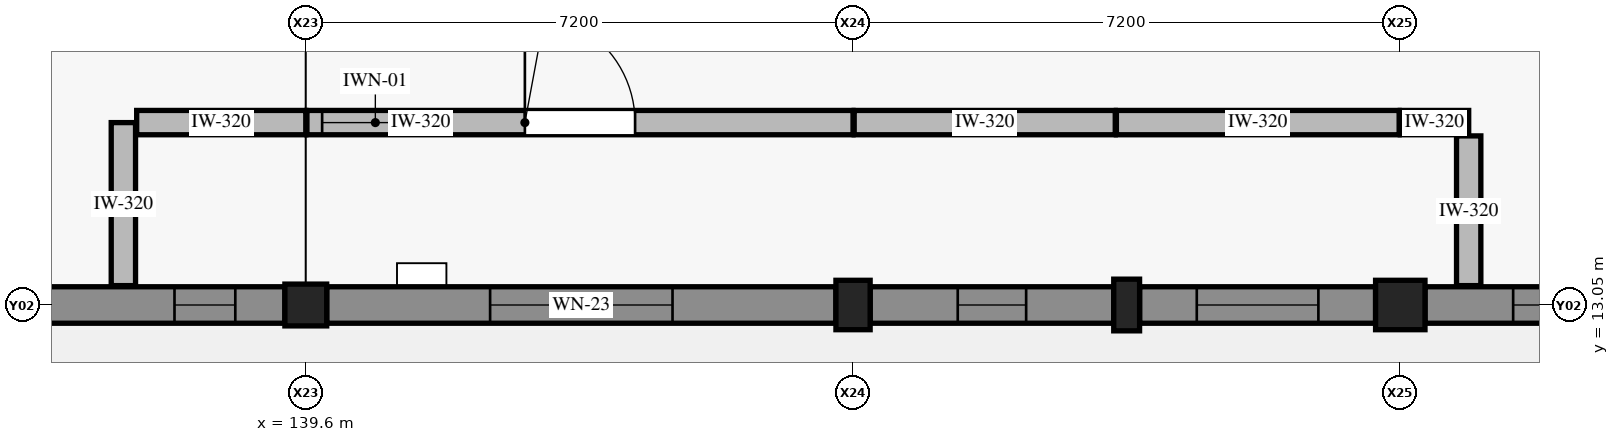
"""IFC4 building model, lengths in metres.
Left out: names, types, materials, properties, quantities, classifications, styles, units other than length and angle.
Written with IfcOpenShell. Run it as: python <this file> out.ifc"""

import sys

from ifc_helpers import new_model, si_unit, direction, frame, frame_2d, origin, origin_2d, place, context, subcontext, project, spatial, rectangle, extrude, element, fill, save


model = new_model("IFC4")
c1 = context("Model", 3, precision=1e-05, world=origin(), true_north=direction((0.0, 1.0)))
c2 = subcontext(c1, "Body", "Model", "MODEL_VIEW")
j1 = project(units=[si_unit("LENGTHUNIT", "METRE"), si_unit("PLANEANGLEUNIT", "RADIAN")], contexts=[c1])
p1 = place(None, origin())
s1 = spatial("IfcSite", under=j1, at=p1, CompositionType="ELEMENT")
p2 = place(p1, origin())
s2 = spatial("IfcBuilding", under=s1, at=p2, CompositionType="ELEMENT")
p3 = place(p2, origin())
s3 = spatial("IfcBuildingStorey", under=s2, at=p3, CompositionType="ELEMENT", Elevation=0.0)
p4 = place(p3, frame((139.6, 13.05, 0.0), z_axis=(0.0, 0.0, 1.0), x_axis=(1.0, 0.0, 0.0)))
e1 = element("IfcColumn", 1, at=p4, inside=s3, PredefinedType="COLUMN", context=c2, shape_type="SweptSolid", body=[
    extrude(rectangle(XDim=0.55, YDim=0.55, at=origin_2d()), origin(), (0.0, 0.0, 1.0), 4.8),
])
p5 = place(p3, frame((146.8, 13.05, 0.0), z_axis=(0.0, 0.0, 1.0), x_axis=(1.0, 0.0, 0.0)))
e2 = element("IfcColumn", 2, at=p5, inside=s3, PredefinedType="COLUMN", context=c2, shape_type="SweptSolid", body=[
    extrude(rectangle(XDim=0.45, YDim=0.65, at=origin_2d()), origin(), (0.0, 0.0, 1.0), 4.8),
])
p6 = place(p3, frame((154.0, 13.05, 0.0), z_axis=(0.0, 0.0, 1.0), x_axis=(1.0, 0.0, 0.0)))
e3 = element("IfcColumn", 3, at=p6, inside=s3, PredefinedType="COLUMN", context=c2, shape_type="SweptSolid", body=[
    extrude(rectangle(XDim=0.65, YDim=0.65, at=origin_2d()), origin(), (0.0, 0.0, 1.0), 4.8),
])
p7 = place(p3, frame((150.4, 13.05, 0.0), z_axis=(0.0, 0.0, 1.0), x_axis=(1.0, 0.0, 0.0)))
e4 = element("IfcColumn", 4, at=p7, inside=s3, PredefinedType="PILASTER", context=c2, shape_type="SweptSolid", body=[
    extrude(rectangle(XDim=0.34, YDim=0.68, at=origin_2d()), origin(), (0.0, 0.0, 1.0), 4.8),
])
p8 = place(p3, frame((157.25, 13.05, 0.0), z_axis=(0.0, 0.0, 1.0), x_axis=(-1.0, 0.0, 0.0)))
e5 = element("IfcWall", 5, at=p8, inside=s3, PredefinedType="SOLIDWALL", context=c2, shape_type="SweptSolid", body=[
    extrude(rectangle(XDim=2.925, YDim=0.48, at=frame_2d((1.462, 0.0))), origin(), (0.0, 0.0, 1.0), 3.64),
])
p9 = place(p8, frame((0.565, 0.0, 0.6)))
e6 = element("IfcOpeningElement", 6, at=p9, cuts=e5, PredefinedType="OPENING", context=c2, shape_type="SweptSolid", body=[
    extrude(rectangle(XDim=1.2, YDim=2.2, at=frame_2d((0.6, 1.1))), frame((0.0, 0.25, 0.0), z_axis=(0.0, -1.0, 0.0), x_axis=(1.0, 0.0, 0.0)), (0.0, 0.0, 1.0), 0.5),
])
p10 = place(p3, frame((153.675, 13.05, 0.0), z_axis=(0.0, 0.0, 1.0), x_axis=(-1.0, 0.0, 0.0)))
e7 = element("IfcWall", 7, at=p10, inside=s3, PredefinedType="SOLIDWALL", context=c2, shape_type="SweptSolid", body=[
    extrude(rectangle(XDim=3.105, YDim=0.48, at=frame_2d((1.552, 0.0))), origin(), (0.0, 0.0, 1.0), 3.64),
])
p11 = place(p10, frame((0.752, 0.0, 0.6)))
e8 = element("IfcOpeningElement", 8, at=p11, cuts=e7, PredefinedType="OPENING", context=c2, shape_type="SweptSolid", body=[
    extrude(rectangle(XDim=1.6, YDim=2.2, at=frame_2d((0.8, 1.1))), frame((0.0, 0.25, 0.0), z_axis=(0.0, -1.0, 0.0), x_axis=(1.0, 0.0, 0.0)), (0.0, 0.0, 1.0), 0.5),
])
p12 = place(p3, frame((150.23, 13.05, 0.0), z_axis=(0.0, 0.0, 1.0), x_axis=(-1.0, 0.0, 0.0)))
e9 = element("IfcWall", 9, at=p12, inside=s3, PredefinedType="SOLIDWALL", context=c2, shape_type="SweptSolid", body=[
    extrude(rectangle(XDim=3.205, YDim=0.48, at=frame_2d((1.603, 0.0))), origin(), (0.0, 0.0, 1.0), 3.64),
])
p13 = place(p12, frame((1.153, 0.0, 0.9)))
e10 = element("IfcOpeningElement", 10, at=p13, cuts=e9, PredefinedType="OPENING", context=c2, shape_type="SweptSolid", body=[
    extrude(rectangle(XDim=0.9, YDim=1.2, at=frame_2d((0.45, 0.6))), frame((0.0, 0.25, 0.0), z_axis=(0.0, -1.0, 0.0), x_axis=(1.0, 0.0, 0.0)), (0.0, 0.0, 1.0), 0.5),
])
p14 = place(p3, frame((146.575, 13.05, 0.0), z_axis=(0.0, 0.0, 1.0), x_axis=(-1.0, 0.0, 0.0)))
e11 = element("IfcWall", 11, at=p14, inside=s3, PredefinedType="SOLIDWALL", context=c2, shape_type="SweptSolid", body=[
    extrude(rectangle(XDim=6.7, YDim=0.48, at=frame_2d((3.35, 0.0))), origin(), (0.0, 0.0, 1.0), 3.64),
])
p15 = place(p14, frame((2.15, 0.0, 0.9)))
e12 = element("IfcOpeningElement", 12, at=p15, cuts=e11, PredefinedType="OPENING", context=c2, shape_type="SweptSolid", body=[
    extrude(rectangle(XDim=2.4, YDim=0.9, at=frame_2d((1.2, 0.45))), frame((0.0, 0.25, 0.0), z_axis=(0.0, -1.0, 0.0), x_axis=(1.0, 0.0, 0.0)), (0.0, 0.0, 1.0), 0.5),
])
p16 = place(p3, frame((139.325, 13.05, 0.0), z_axis=(0.0, 0.0, 1.0), x_axis=(-1.0, 0.0, 0.0)))
e13 = element("IfcWall", 13, at=p16, inside=s3, PredefinedType="SOLIDWALL", context=c2, shape_type="SweptSolid", body=[
    extrude(rectangle(XDim=3.135, YDim=0.48, at=frame_2d((1.567, 0.0))), origin(), (0.0, 0.0, 1.0), 3.64),
])
p17 = place(p16, frame((0.653, 0.0, 0.6)))
e14 = element("IfcOpeningElement", 14, at=p17, cuts=e13, PredefinedType="OPENING", context=c2, shape_type="SweptSolid", body=[
    extrude(rectangle(XDim=0.8, YDim=2.6, at=frame_2d((0.4, 1.3))), frame((0.0, 0.25, 0.0), z_axis=(0.0, -1.0, 0.0), x_axis=(1.0, 0.0, 0.0)), (0.0, 0.0, 1.0), 0.5),
])
p18 = place(p3, frame((154.0, 15.45, 0.0), z_axis=(0.0, 0.0, 1.0), x_axis=(1.0, 0.0, 0.0)))
e15 = element("IfcWall", 15, at=p18, inside=s3, PredefinedType="PARTITIONING", context=c2, shape_type="SweptSolid", body=[
    extrude(rectangle(XDim=0.9, YDim=0.32, at=frame_2d((0.45, 0.0))), origin(), (0.0, 0.0, 1.0), 3.965),
])
p19 = place(p3, frame((154.9, 13.305, 0.0), z_axis=(0.0, 0.0, 1.0), x_axis=(0.0, 1.0, 0.0)))
e16 = element("IfcWall", 16, at=p19, inside=s3, PredefinedType="PARTITIONING", context=c2, shape_type="SweptSolid", body=[
    extrude(rectangle(XDim=1.97, YDim=0.32, at=frame_2d((0.985, 0.0))), origin(), (0.0, 0.0, 1.0), 4.46),
])
p20 = place(p3, frame((137.2, 13.305, 0.0), z_axis=(0.0, 0.0, 1.0), x_axis=(0.0, 1.0, 0.0)))
e17 = element("IfcWall", 17, at=p20, inside=s3, PredefinedType="PARTITIONING", context=c2, shape_type="SweptSolid", body=[
    extrude(rectangle(XDim=2.145, YDim=0.32, at=frame_2d((1.073, 0.0))), origin(), (0.0, 0.0, 1.0), 3.985),
])
p21 = place(p3, frame((137.375, 15.45, 0.0), z_axis=(0.0, 0.0, 1.0), x_axis=(1.0, 0.0, 0.0)))
e18 = element("IfcWall", 18, at=p21, inside=s3, PredefinedType="PARTITIONING", context=c2, shape_type="SweptSolid", body=[
    extrude(rectangle(XDim=2.225, YDim=0.32, at=frame_2d((1.113, 0.0))), origin(), (0.0, 0.0, 1.0), 3.725),
])
p22 = place(p3, frame((139.615, 15.45, 0.0), z_axis=(0.0, 0.0, 1.0), x_axis=(1.0, 0.0, 0.0)))
e19 = element("IfcWall", 19, at=p22, inside=s3, PredefinedType="PARTITIONING", context=c2, shape_type="SweptSolid", body=[
    extrude(rectangle(XDim=7.185, YDim=0.32, at=frame_2d((3.593, 0.0))), origin(), (0.0, 0.0, 1.0), 3.725),
])
p23 = place(p22, frame((2.867, 0.0, 0.0)))
e20 = element("IfcOpeningElement", 20, at=p23, cuts=e19, PredefinedType="OPENING", context=c2, shape_type="SweptSolid", body=[
    extrude(rectangle(XDim=1.45, YDim=2.25, at=frame_2d((0.725, 1.125))), frame((0.0, 0.17, 0.0), z_axis=(0.0, -1.0, 0.0), x_axis=(1.0, 0.0, 0.0)), (0.0, 0.0, 1.0), 0.34),
])
p24 = place(p22, frame((0.2, 0.0, 1.05)))
e21 = element("IfcOpeningElement", 21, at=p24, cuts=e19, PredefinedType="OPENING", context=c2, shape_type="SweptSolid", body=[
    extrude(rectangle(XDim=1.4, YDim=1.1, at=frame_2d((0.7, 0.55))), frame((0.0, 0.17, 0.0), z_axis=(0.0, -1.0, 0.0), x_axis=(1.0, 0.0, 0.0)), (0.0, 0.0, 1.0), 0.34),
])
p25 = place(p3, frame((146.815, 15.45, 0.0), z_axis=(0.0, 0.0, 1.0), x_axis=(1.0, 0.0, 0.0)))
e22 = element("IfcWall", 22, at=p25, inside=s3, PredefinedType="PARTITIONING", context=c2, shape_type="SweptSolid", body=[
    extrude(rectangle(XDim=3.435, YDim=0.32, at=frame_2d((1.718, 0.0))), origin(), (0.0, 0.0, 1.0), 3.795),
])
p26 = place(p3, frame((150.265, 15.45, 0.0), z_axis=(0.0, 0.0, 1.0), x_axis=(1.0, 0.0, 0.0)))
e23 = element("IfcWall", 23, at=p26, inside=s3, PredefinedType="PARTITIONING", context=c2, shape_type="SweptSolid", body=[
    extrude(rectangle(XDim=3.72, YDim=0.32, at=frame_2d((1.86, 0.0))), origin(), (0.0, 0.0, 1.0), 3.965),
])
p27 = place(p9, origin())
e24 = element("IfcWindow", 24, at=p27, inside=s3, PartitioningType="SINGLE_PANEL", PredefinedType="WINDOW", context=c2, shape_type="SweptSolid", body=[
    extrude(rectangle(XDim=1.2, YDim=2.2, at=frame_2d((0.6, 1.1))), frame((0.0, 0.03, 0.0), z_axis=(0.0, -1.0, 0.0), x_axis=(1.0, 0.0, 0.0)), (0.0, 0.0, 1.0), 0.06),
])
fill(e6, e24)
p28 = place(p11, origin())
e25 = element("IfcWindow", 25, at=p28, inside=s3, PartitioningType="SINGLE_PANEL", PredefinedType="WINDOW", context=c2, shape_type="SweptSolid", body=[
    extrude(rectangle(XDim=1.6, YDim=2.2, at=frame_2d((0.8, 1.1))), frame((0.0, 0.03, 0.0), z_axis=(0.0, -1.0, 0.0), x_axis=(1.0, 0.0, 0.0)), (0.0, 0.0, 1.0), 0.06),
])
fill(e8, e25)
p29 = place(p13, origin())
e26 = element("IfcWindow", 26, at=p29, inside=s3, PartitioningType="SINGLE_PANEL", PredefinedType="WINDOW", context=c2, shape_type="SweptSolid", body=[
    extrude(rectangle(XDim=0.9, YDim=1.2, at=frame_2d((0.45, 0.6))), frame((0.0, 0.03, 0.0), z_axis=(0.0, -1.0, 0.0), x_axis=(1.0, 0.0, 0.0)), (0.0, 0.0, 1.0), 0.06),
])
fill(e10, e26)
p30 = place(p15, origin())
e27 = element("IfcWindow", 27, at=p30, inside=s3, PartitioningType="SINGLE_PANEL", PredefinedType="WINDOW", context=c2, shape_type="SweptSolid", body=[
    extrude(rectangle(XDim=2.4, YDim=0.9, at=frame_2d((1.2, 0.45))), frame((0.0, 0.03, 0.0), z_axis=(0.0, -1.0, 0.0), x_axis=(1.0, 0.0, 0.0)), (0.0, 0.0, 1.0), 0.06),
])
fill(e12, e27)
p31 = place(p17, origin())
e28 = element("IfcWindow", 28, at=p31, inside=s3, PartitioningType="SINGLE_PANEL", PredefinedType="WINDOW", context=c2, shape_type="SweptSolid", body=[
    extrude(rectangle(XDim=0.8, YDim=2.6, at=frame_2d((0.4, 1.3))), frame((0.0, 0.03, 0.0), z_axis=(0.0, -1.0, 0.0), x_axis=(1.0, 0.0, 0.0)), (0.0, 0.0, 1.0), 0.06),
])
fill(e14, e28)
p32 = place(p23, origin())
e29 = element("IfcDoor", 29, at=p32, inside=s3, OperationType="SINGLE_SWING_LEFT", PredefinedType="DOOR", context=c2, shape_type="SweptSolid", body=[
    extrude(rectangle(XDim=1.45, YDim=2.25, at=frame_2d((0.725, 1.125))), frame((0.0, 0.025, 0.0), z_axis=(0.0, -1.0, 0.0), x_axis=(1.0, 0.0, 0.0)), (0.0, 0.0, 1.0), 0.05),
])
fill(e20, e29)
p33 = place(p24, origin())
e30 = element("IfcWindow", 30, at=p33, inside=s3, PartitioningType="SINGLE_PANEL", PredefinedType="WINDOW", context=c2, shape_type="SweptSolid", body=[
    extrude(rectangle(XDim=1.4, YDim=1.1, at=frame_2d((0.7, 0.55))), frame((0.0, 0.03, 0.0), z_axis=(0.0, -1.0, 0.0), x_axis=(1.0, 0.0, 0.0)), (0.0, 0.0, 1.0), 0.06),
])
fill(e21, e30)
save(model, sys.argv[1])
